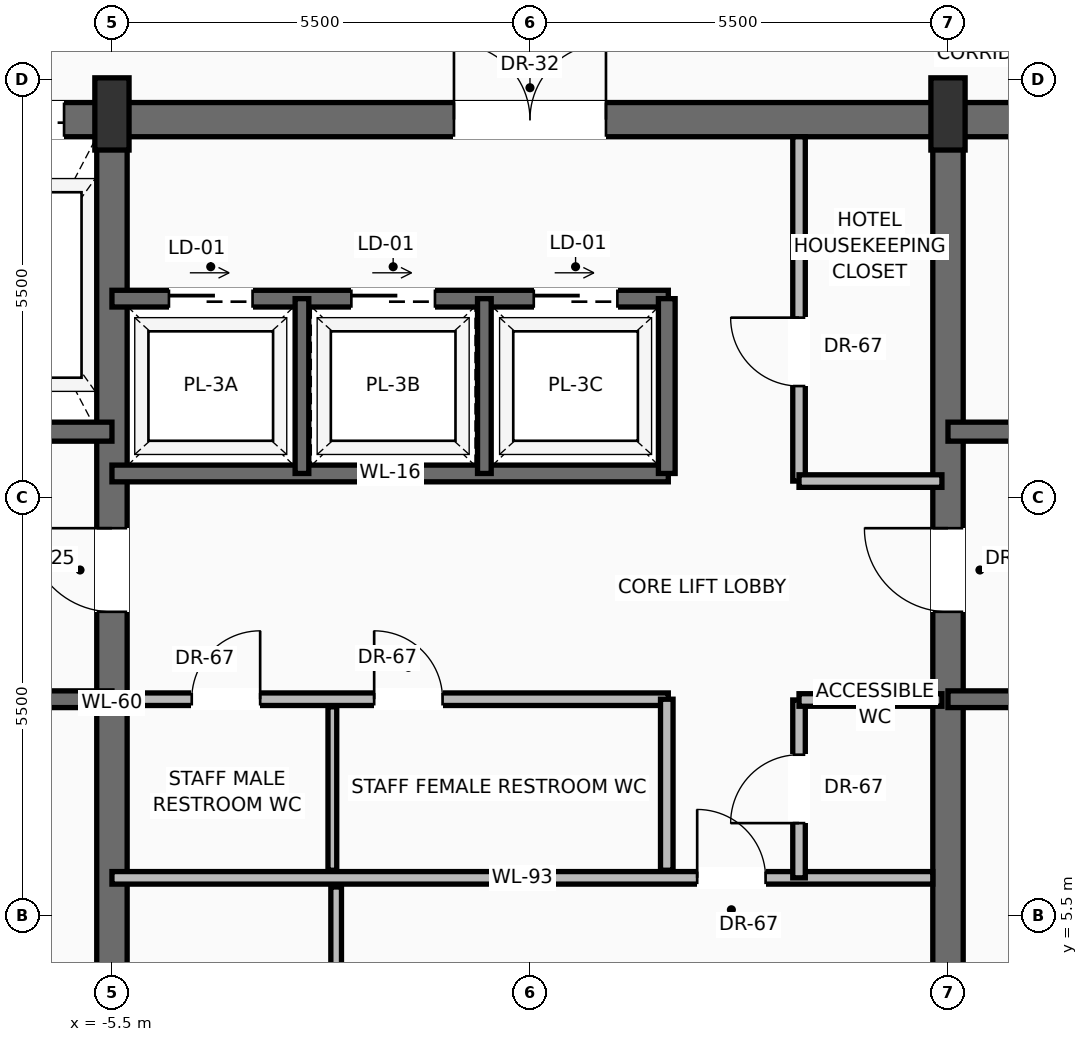
"""IFC4 building model, lengths in metres.
Left out: names, types, materials, properties, quantities, classifications, styles, units other than length and angle.
Written with IfcOpenShell. Run it as: python <this file> out.ifc"""

import sys

from ifc_helpers import new_model, si_unit, direction, frame, frame_2d, origin, origin_2d, place, context, subcontext, project, spatial, rectangle, extrude, source, transform, mapped, element, fill, save


model = new_model("IFC4")
c1 = context("Model", 3, precision=1e-05, world=origin(), true_north=direction((0.0, 1.0)))
c2 = subcontext(c1, "Body", "Model", "MODEL_VIEW")
j1 = project(units=[si_unit("LENGTHUNIT", "METRE"), si_unit("PLANEANGLEUNIT", "RADIAN")], contexts=[c1])
p1 = place(None, origin())
s1 = spatial("IfcSite", under=j1, at=p1, CompositionType="ELEMENT")
p2 = place(p1, origin())
s2 = spatial("IfcBuilding", under=s1, at=p2, CompositionType="ELEMENT")
p3 = place(p2, frame((0.0, 0.0, 290.25)))
s3 = spatial("IfcBuildingStorey", under=s2, at=p3, CompositionType="ELEMENT", Elevation=290.25)
p4 = place(p3, frame((-10.6, 15.975, 0.0), z_axis=(0.0, 0.0, 1.0), x_axis=(1.0, 0.0, 0.0)))
e1 = element("IfcWall", 1, at=p4, inside=s3, PredefinedType="SHEAR", context=c2, shape_type="SweptSolid", body=[
    extrude(rectangle(XDim=21.2, YDim=0.45, at=frame_2d((10.6, 0.0))), origin(), (0.0, 0.0, 1.0), 3.24),
])
p5 = place(p4, frame((3.17, 0.0, 0.0)))
e2 = element("IfcOpeningElement", 2, at=p5, cuts=e1, PredefinedType="OPENING", context=c2, shape_type="SweptSolid", body=[
    extrude(rectangle(XDim=1.3, YDim=2.3, at=frame_2d((0.65, 1.15))), frame((0.0, 0.235, 0.0), z_axis=(0.0, -1.0, 0.0), x_axis=(1.0, 0.0, 0.0)), (0.0, 0.0, 1.0), 0.47),
])
p6 = place(p4, frame((9.6, 0.0, 0.0)))
e3 = element("IfcOpeningElement", 3, at=p6, cuts=e1, PredefinedType="OPENING", context=c2, shape_type="SweptSolid", body=[
    extrude(rectangle(XDim=2.0, YDim=2.4, at=frame_2d((1.0, 1.2))), frame((0.0, 0.235, 0.0), z_axis=(0.0, -1.0, 0.0), x_axis=(1.0, 0.0, 0.0)), (0.0, 0.0, 1.0), 0.47),
])
p7 = place(p3, frame((-5.5, 0.625, 0.0), z_axis=(0.0, 0.0, 1.0), x_axis=(0.0, 1.0, 0.0)))
e4 = element("IfcWall", 4, at=p7, inside=s3, PredefinedType="SHEAR", context=c2, shape_type="SweptSolid", body=[
    extrude(rectangle(XDim=15.35, YDim=0.4, at=frame_2d((7.675, 0.0))), origin(), (0.0, 0.0, 1.0), 3.24),
])
p8 = place(p7, frame((8.875, 0.0, 0.0)))
e5 = element("IfcOpeningElement", 5, at=p8, cuts=e4, PredefinedType="OPENING", context=c2, shape_type="SweptSolid", body=[
    extrude(rectangle(XDim=1.1, YDim=2.2, at=frame_2d((0.55, 1.1))), frame((0.0, 0.21, 0.0), z_axis=(0.0, -1.0, 0.0), x_axis=(1.0, 0.0, 0.0)), (0.0, 0.0, 1.0), 0.42),
])
p9 = place(p3, frame((5.5, 0.625, 0.0), z_axis=(0.0, 0.0, 1.0), x_axis=(0.0, 1.0, 0.0)))
e6 = element("IfcWall", 6, at=p9, inside=s3, PredefinedType="SHEAR", context=c2, shape_type="SweptSolid", body=[
    extrude(rectangle(XDim=15.35, YDim=0.4, at=frame_2d((7.675, 0.0))), origin(), (0.0, 0.0, 1.0), 3.24),
])
p10 = place(p9, frame((8.875, 0.0, 0.0)))
e7 = element("IfcOpeningElement", 7, at=p10, cuts=e6, PredefinedType="OPENING", context=c2, shape_type="SweptSolid", body=[
    extrude(rectangle(XDim=1.1, YDim=2.2, at=frame_2d((0.55, 1.1))), frame((0.0, 0.21, 0.0), z_axis=(0.0, -1.0, 0.0), x_axis=(1.0, 0.0, 0.0)), (0.0, 0.0, 1.0), 0.42),
])
m1 = source(origin(), c2, "Body", "SweptSolid", [
    extrude(rectangle(XDim=0.45, YDim=0.95, at=origin_2d()), origin(), (0.0, 0.0, 1.0), 3.45),
])
for number, where, z_axis, x_axis in (
    (8, (-5.5, 16.05, 0.0), (0.0, 0.0, 1.0), (1.0, 0.0, 0.0)),
    (9, (5.5, 16.05, 0.0), (0.0, 0.0, 1.0), (1.0, 0.0, 0.0)),
):
    element("IfcColumn", number, at=place(p3, frame(where, z_axis=z_axis, x_axis=x_axis)), inside=s3, PredefinedType="PILASTER", context=c2, shape_type="MappedRepresentation", body=[
        mapped(m1, transform((0.0, 0.0, 0.0), scale=1.0)),
    ])
p11 = place(p3, frame((-5.5, 8.35, 0.0), z_axis=(0.0, 0.0, 1.0), x_axis=(-1.0, 0.0, 0.0)))
e10 = element("IfcWall", 10, at=p11, inside=s3, PredefinedType="SOLIDWALL", context=c2, shape_type="SweptSolid", body=[
    extrude(rectangle(XDim=4.65, YDim=0.22, at=frame_2d((2.325, 0.0))), origin(), (0.0, 0.0, 1.0), 3.24),
])
p12 = place(p11, frame((2.5, 0.0, 0.0)))
e11 = element("IfcOpeningElement", 11, at=p12, cuts=e10, PredefinedType="OPENING", context=c2, shape_type="SweptSolid", body=[
    extrude(rectangle(XDim=1.15, YDim=2.2, at=frame_2d((0.575, 1.1))), frame((0.0, 0.12, 0.0), z_axis=(0.0, -1.0, 0.0), x_axis=(1.0, 0.0, 0.0)), (0.0, 0.0, 1.0), 0.24),
])
p13 = place(p3, frame((-5.5, 11.87, 0.0), z_axis=(0.0, 0.0, 1.0), x_axis=(-1.0, 0.0, 0.0)))
e12 = element("IfcWall", 12, at=p13, inside=s3, PredefinedType="SOLIDWALL", context=c2, shape_type="SweptSolid", body=[
    extrude(rectangle(XDim=4.65, YDim=0.25, at=frame_2d((2.325, 0.0))), origin(), (0.0, 0.0, 1.0), 3.24),
])
p14 = place(p13, frame((2.95, 0.0, 0.0)))
e13 = element("IfcOpeningElement", 13, at=p14, cuts=e12, PredefinedType="OPENING", context=c2, shape_type="SweptSolid", body=[
    extrude(rectangle(XDim=1.2, YDim=2.25, at=frame_2d((0.6, 1.125))), frame((0.0, 0.135, 0.0), z_axis=(0.0, -1.0, 0.0), x_axis=(1.0, 0.0, 0.0)), (0.0, 0.0, 1.0), 0.27),
])
p15 = place(p3, frame((10.15, 8.35, 0.0), z_axis=(0.0, 0.0, 1.0), x_axis=(-1.0, 0.0, 0.0)))
e14 = element("IfcWall", 14, at=p15, inside=s3, PredefinedType="SOLIDWALL", context=c2, shape_type="SweptSolid", body=[
    extrude(rectangle(XDim=4.65, YDim=0.22, at=frame_2d((2.325, 0.0))), origin(), (0.0, 0.0, 1.0), 3.24),
])
p16 = place(p15, frame((1.0, 0.0, 0.0)))
e15 = element("IfcOpeningElement", 15, at=p16, cuts=e14, PredefinedType="OPENING", context=c2, shape_type="SweptSolid", body=[
    extrude(rectangle(XDim=1.15, YDim=2.2, at=frame_2d((0.575, 1.1))), frame((0.0, 0.12, 0.0), z_axis=(0.0, -1.0, 0.0), x_axis=(1.0, 0.0, 0.0)), (0.0, 0.0, 1.0), 0.24),
])
p17 = place(p3, frame((10.15, 11.87, 0.0), z_axis=(0.0, 0.0, 1.0), x_axis=(-1.0, 0.0, 0.0)))
e16 = element("IfcWall", 16, at=p17, inside=s3, PredefinedType="SOLIDWALL", context=c2, shape_type="SweptSolid", body=[
    extrude(rectangle(XDim=4.65, YDim=0.25, at=frame_2d((2.325, 0.0))), origin(), (0.0, 0.0, 1.0), 3.24),
])
p18 = place(p17, frame((0.5, 0.0, 0.0)))
e17 = element("IfcOpeningElement", 17, at=p18, cuts=e16, PredefinedType="OPENING", context=c2, shape_type="SweptSolid", body=[
    extrude(rectangle(XDim=1.2, YDim=2.25, at=frame_2d((0.6, 1.125))), frame((0.0, 0.135, 0.0), z_axis=(0.0, -1.0, 0.0), x_axis=(1.0, 0.0, 0.0)), (0.0, 0.0, 1.0), 0.27),
])
p19 = place(p3, frame((-5.5, 6.0, 0.0), z_axis=(0.0, 0.0, 1.0), x_axis=(1.0, 0.0, 0.0)))
e18 = element("IfcWall", 18, at=p19, inside=s3, PredefinedType="PARTITIONING", context=c2, shape_type="SweptSolid", body=[
    extrude(rectangle(XDim=10.8, YDim=0.165, at=frame_2d((5.4, 0.0))), origin(), (0.0, 0.0, 1.0), 3.232),
])
p20 = place(p19, frame((7.7, 0.0, 0.0)))
e19 = element("IfcOpeningElement", 19, at=p20, cuts=e18, PredefinedType="OPENING", context=c2, shape_type="SweptSolid", body=[
    extrude(rectangle(XDim=0.9, YDim=2.1, at=frame_2d((0.45, 1.05))), frame((0.0, 0.093, 0.0), z_axis=(0.0, -1.0, 0.0), x_axis=(1.0, 0.0, 0.0)), (0.0, 0.0, 1.0), 0.185),
])
p21 = place(p3, frame((-2.55, 0.85, 0.0), z_axis=(0.0, 0.0, 1.0), x_axis=(0.0, 1.0, 0.0)))
e20 = element("IfcWall", 20, at=p21, inside=s3, PredefinedType="PARTITIONING", context=c2, shape_type="SweptSolid", body=[
    extrude(rectangle(XDim=5.03, YDim=0.14, at=frame_2d((2.515, 0.0))), origin(), (0.0, 0.0, 1.0), 3.232),
])
p22 = place(p21, frame((2.1, 0.0, 0.0)))
e21 = element("IfcOpeningElement", 21, at=p22, cuts=e20, PredefinedType="OPENING", context=c2, shape_type="SweptSolid", body=[
    extrude(rectangle(XDim=0.9, YDim=2.1, at=frame_2d((0.45, 1.05))), frame((0.0, 0.08, 0.0), z_axis=(0.0, -1.0, 0.0), x_axis=(1.0, 0.0, 0.0)), (0.0, 0.0, 1.0), 0.16),
])
p23 = place(p3, frame((3.54, 6.0, 0.0), z_axis=(0.0, 0.0, 1.0), x_axis=(0.0, 1.0, 0.0)))
e22 = element("IfcWall", 22, at=p23, inside=s3, PredefinedType="PARTITIONING", context=c2, shape_type="SweptSolid", body=[
    extrude(rectangle(XDim=2.34, YDim=0.165, at=frame_2d((1.17, 0.0))), origin(), (0.0, 0.0, 1.0), 3.232),
])
p24 = place(p23, frame((0.72, 0.0, 0.0)))
e23 = element("IfcOpeningElement", 23, at=p24, cuts=e22, PredefinedType="OPENING", context=c2, shape_type="SweptSolid", body=[
    extrude(rectangle(XDim=0.9, YDim=2.1, at=frame_2d((0.45, 1.05))), frame((0.0, 0.093, 0.0), z_axis=(0.0, -1.0, 0.0), x_axis=(1.0, 0.0, 0.0)), (0.0, 0.0, 1.0), 0.185),
])
p25 = place(p3, frame((3.54, 8.34, 0.0), z_axis=(0.0, 0.0, 1.0), x_axis=(1.0, 0.0, 0.0)))
e24 = element("IfcWall", 24, at=p25, inside=s3, PredefinedType="PARTITIONING", context=c2, shape_type="SweptSolid", body=[
    extrude(rectangle(XDim=1.88, YDim=0.165, at=frame_2d((0.94, 0.0))), origin(), (0.0, 0.0, 1.0), 3.232),
])
p26 = place(p3, frame((-5.3, 8.35, 0.0), z_axis=(0.0, 0.0, 1.0), x_axis=(1.0, 0.0, 0.0)))
e25 = element("IfcWall", 25, at=p26, inside=s3, PredefinedType="PARTITIONING", context=c2, shape_type="SweptSolid", body=[
    extrude(rectangle(XDim=7.12, YDim=0.165, at=frame_2d((3.56, 0.0))), origin(), (0.0, 0.0, 1.0), 3.232),
])
p27 = place(p26, frame((0.85, 0.0, 0.0)))
e26 = element("IfcOpeningElement", 26, at=p27, cuts=e25, PredefinedType="OPENING", context=c2, shape_type="SweptSolid", body=[
    extrude(rectangle(XDim=0.9, YDim=2.1, at=frame_2d((0.45, 1.05))), frame((0.0, 0.093, 0.0), z_axis=(0.0, -1.0, 0.0), x_axis=(1.0, 0.0, 0.0)), (0.0, 0.0, 1.0), 0.185),
])
p28 = place(p26, frame((3.25, 0.0, 0.0)))
e27 = element("IfcOpeningElement", 27, at=p28, cuts=e25, PredefinedType="OPENING", context=c2, shape_type="SweptSolid", body=[
    extrude(rectangle(XDim=0.9, YDim=2.1, at=frame_2d((0.45, 1.05))), frame((0.0, 0.093, 0.0), z_axis=(0.0, -1.0, 0.0), x_axis=(1.0, 0.0, 0.0)), (0.0, 0.0, 1.0), 0.185),
])
p29 = place(p3, frame((1.8, 6.1, 0.0), z_axis=(0.0, 0.0, 1.0), x_axis=(0.0, 1.0, 0.0)))
e28 = element("IfcWall", 28, at=p29, inside=s3, PredefinedType="PARTITIONING", context=c2, shape_type="SweptSolid", body=[
    extrude(rectangle(XDim=2.25, YDim=0.165, at=frame_2d((1.125, 0.0))), origin(), (0.0, 0.0, 1.0), 3.232),
])
p30 = place(p3, frame((-2.6, 6.1, 0.0), z_axis=(0.0, 0.0, 1.0), x_axis=(0.0, 1.0, 0.0)))
e29 = element("IfcWall", 29, at=p30, inside=s3, PredefinedType="PARTITIONING", context=c2, shape_type="SweptSolid", body=[
    extrude(rectangle(XDim=2.15, YDim=0.115, at=frame_2d((1.075, 0.0))), origin(), (0.0, 0.0, 1.0), 3.232),
])
p31 = place(p3, frame((-5.5, 11.32, 0.0), z_axis=(0.0, 0.0, 1.0), x_axis=(1.0, 0.0, 0.0)))
e30 = element("IfcWall", 30, at=p31, inside=s3, PredefinedType="SOLIDWALL", context=c2, shape_type="SweptSolid", body=[
    extrude(rectangle(XDim=7.32, YDim=0.22, at=frame_2d((3.66, 0.0))), origin(), (0.0, 0.0, 1.0), 3.24),
])
p32 = place(p3, frame((-5.5, 13.62, 0.0), z_axis=(0.0, 0.0, 1.0), x_axis=(1.0, 0.0, 0.0)))
e31 = element("IfcWall", 31, at=p32, inside=s3, PredefinedType="SOLIDWALL", context=c2, shape_type="SweptSolid", body=[
    extrude(rectangle(XDim=7.32, YDim=0.22, at=frame_2d((3.66, 0.0))), origin(), (0.0, 0.0, 1.0), 3.24),
])
p33 = place(p32, frame((0.75, 0.0, 0.0)))
e32 = element("IfcOpeningElement", 32, at=p33, cuts=e31, PredefinedType="OPENING", context=c2, shape_type="SweptSolid", body=[
    extrude(rectangle(XDim=1.1, YDim=2.2, at=frame_2d((0.55, 1.1))), frame((0.0, 0.12, 0.0), z_axis=(0.0, -1.0, 0.0), x_axis=(1.0, 0.0, 0.0)), (0.0, 0.0, 1.0), 0.24),
])
p34 = place(p32, frame((3.15, 0.0, 0.0)))
e33 = element("IfcOpeningElement", 33, at=p34, cuts=e31, PredefinedType="OPENING", context=c2, shape_type="SweptSolid", body=[
    extrude(rectangle(XDim=1.1, YDim=2.2, at=frame_2d((0.55, 1.1))), frame((0.0, 0.12, 0.0), z_axis=(0.0, -1.0, 0.0), x_axis=(1.0, 0.0, 0.0)), (0.0, 0.0, 1.0), 0.24),
])
p35 = place(p32, frame((5.55, 0.0, 0.0)))
e34 = element("IfcOpeningElement", 34, at=p35, cuts=e31, PredefinedType="OPENING", context=c2, shape_type="SweptSolid", body=[
    extrude(rectangle(XDim=1.1, YDim=2.2, at=frame_2d((0.55, 1.1))), frame((0.0, 0.12, 0.0), z_axis=(0.0, -1.0, 0.0), x_axis=(1.0, 0.0, 0.0)), (0.0, 0.0, 1.0), 0.24),
])
p36 = place(p3, frame((1.8, 11.32, 0.0), z_axis=(0.0, 0.0, 1.0), x_axis=(0.0, 1.0, 0.0)))
e35 = element("IfcWall", 35, at=p36, inside=s3, PredefinedType="SOLIDWALL", context=c2, shape_type="SweptSolid", body=[
    extrude(rectangle(XDim=2.3, YDim=0.22, at=frame_2d((1.15, 0.0))), origin(), (0.0, 0.0, 1.0), 3.24),
])
for number, where, z_axis, x_axis in (
    (36, (-3.0, 11.32, 0.0), (0.0, 0.0, 1.0), (0.0, 1.0, 0.0)),
    (37, (-0.6, 11.32, 0.0), (0.0, 0.0, 1.0), (0.0, 1.0, 0.0)),
):
    element("IfcWall", number, at=place(p3, frame(where, z_axis=z_axis, x_axis=x_axis)), inside=s3, PredefinedType="SOLIDWALL", context=c2, shape_type="SweptSolid", body=[
        extrude(rectangle(XDim=2.3, YDim=0.18, at=frame_2d((1.15, 0.0))), origin(), (0.0, 0.0, 1.0), 3.24),
    ])
p37 = place(p3, frame((3.54, 11.22, 0.0), z_axis=(0.0, 0.0, 1.0), x_axis=(0.0, 1.0, 0.0)))
e38 = element("IfcWall", 38, at=p37, inside=s3, PredefinedType="PARTITIONING", context=c2, shape_type="SweptSolid", body=[
    extrude(rectangle(XDim=4.53, YDim=0.165, at=frame_2d((2.265, 0.0))), origin(), (0.0, 0.0, 1.0), 3.232),
])
p38 = place(p37, frame((1.25, 0.0, 0.0)))
e39 = element("IfcOpeningElement", 39, at=p38, cuts=e38, PredefinedType="OPENING", context=c2, shape_type="SweptSolid", body=[
    extrude(rectangle(XDim=0.9, YDim=2.1, at=frame_2d((0.45, 1.05))), frame((0.0, 0.093, 0.0), z_axis=(0.0, -1.0, 0.0), x_axis=(1.0, 0.0, 0.0)), (0.0, 0.0, 1.0), 0.185),
])
p39 = place(p3, frame((3.54, 11.22, 0.0), z_axis=(0.0, 0.0, 1.0), x_axis=(1.0, 0.0, 0.0)))
e40 = element("IfcWall", 40, at=p39, inside=s3, PredefinedType="PARTITIONING", context=c2, shape_type="SweptSolid", body=[
    extrude(rectangle(XDim=1.88, YDim=0.165, at=frame_2d((0.94, 0.0))), origin(), (0.0, 0.0, 1.0), 3.232),
])
m2 = source(origin(), c2, "Body", "SweptSolid", [
    extrude(rectangle(XDim=1.1, YDim=2.2, at=frame_2d((0.55, 1.1))), frame((0.0, 0.025, 0.0), z_axis=(0.0, -1.0, 0.0), x_axis=(1.0, 0.0, 0.0)), (0.0, 0.0, 1.0), 0.05),
])
p40 = place(p8, origin())
e41 = element("IfcDoor", 41, at=p40, inside=s3, OperationType="SINGLE_SWING_RIGHT", PredefinedType="DOOR", context=c2, shape_type="MappedRepresentation", body=[
    mapped(m2, transform((0.0, 0.0, 0.0), scale=1.0)),
])
fill(e5, e41)
m3 = source(origin(), c2, "Body", "SweptSolid", [
    extrude(rectangle(XDim=1.3, YDim=2.3, at=frame_2d((0.65, 1.15))), frame((0.0, 0.025, 0.0), z_axis=(0.0, -1.0, 0.0), x_axis=(1.0, 0.0, 0.0)), (0.0, 0.0, 1.0), 0.05),
])
p41 = place(p5, origin())
e42 = element("IfcDoor", 42, at=p41, inside=s3, OperationType="SLIDING_TO_RIGHT", PredefinedType="DOOR", context=c2, shape_type="MappedRepresentation", body=[
    mapped(m3, transform((0.0, 0.0, 0.0), scale=1.0)),
])
fill(e2, e42)
p42 = place(p10, origin())
e43 = element("IfcDoor", 43, at=p42, inside=s3, OperationType="SINGLE_SWING_RIGHT", PredefinedType="DOOR", context=c2, shape_type="MappedRepresentation", body=[
    mapped(m2, transform((0.0, 0.0, 0.0), scale=1.0)),
])
fill(e7, e43)
m4 = source(origin(), c2, "Body", "SweptSolid", [
    extrude(rectangle(XDim=2.0, YDim=2.4, at=frame_2d((1.0, 1.2))), frame((0.0, 0.025, 0.0), z_axis=(0.0, -1.0, 0.0), x_axis=(1.0, 0.0, 0.0)), (0.0, 0.0, 1.0), 0.05),
])
p43 = place(p6, origin())
e44 = element("IfcDoor", 44, at=p43, inside=s3, OperationType="DOUBLE_DOOR_SINGLE_SWING", PredefinedType="DOOR", context=c2, shape_type="MappedRepresentation", body=[
    mapped(m4, transform((0.0, 0.0, 0.0), scale=1.0)),
])
fill(e3, e44)
m5 = source(origin(), c2, "Body", "SweptSolid", [
    extrude(rectangle(XDim=0.9, YDim=2.1, at=frame_2d((0.45, 1.05))), frame((0.0, 0.025, 0.0), z_axis=(0.0, -1.0, 0.0), x_axis=(1.0, 0.0, 0.0)), (0.0, 0.0, 1.0), 0.05),
])
p44 = place(p20, origin())
e45 = element("IfcDoor", 45, at=p44, inside=s3, OperationType="SINGLE_SWING_LEFT", PredefinedType="DOOR", context=c2, shape_type="MappedRepresentation", body=[
    mapped(m5, transform((0.0, 0.0, 0.0), scale=1.0)),
])
fill(e19, e45)
p45 = place(p24, origin())
e46 = element("IfcDoor", 46, at=p45, inside=s3, OperationType="SINGLE_SWING_LEFT", PredefinedType="DOOR", context=c2, shape_type="MappedRepresentation", body=[
    mapped(m5, transform((0.0, 0.0, 0.0), scale=1.0)),
])
fill(e23, e46)
p46 = place(p27, origin())
e47 = element("IfcDoor", 47, at=p46, inside=s3, OperationType="SINGLE_SWING_RIGHT", PredefinedType="DOOR", context=c2, shape_type="MappedRepresentation", body=[
    mapped(m5, transform((0.0, 0.0, 0.0), scale=1.0)),
])
fill(e26, e47)
p47 = place(p28, origin())
e48 = element("IfcDoor", 48, at=p47, inside=s3, OperationType="SINGLE_SWING_LEFT", PredefinedType="DOOR", context=c2, shape_type="MappedRepresentation", body=[
    mapped(m5, transform((0.0, 0.0, 0.0), scale=1.0)),
])
fill(e27, e48)
m6 = source(origin(), c2, "Body", "SweptSolid", [
    extrude(rectangle(XDim=1.1, YDim=2.2, at=frame_2d((0.55, 1.1))), frame((0.0, 0.025, 0.0), z_axis=(0.0, -1.0, 0.0), x_axis=(1.0, 0.0, 0.0)), (0.0, 0.0, 1.0), 0.05),
])
p48 = place(p33, origin())
e49 = element("IfcDoor", 49, at=p48, inside=s3, OperationType="SLIDING_TO_RIGHT", PredefinedType="DOOR", context=c2, shape_type="MappedRepresentation", body=[
    mapped(m6, transform((0.0, 0.0, 0.0), scale=1.0)),
])
fill(e32, e49)
p49 = place(p34, origin())
e50 = element("IfcDoor", 50, at=p49, inside=s3, OperationType="SLIDING_TO_RIGHT", PredefinedType="DOOR", context=c2, shape_type="MappedRepresentation", body=[
    mapped(m6, transform((0.0, 0.0, 0.0), scale=1.0)),
])
fill(e33, e50)
p50 = place(p35, origin())
e51 = element("IfcDoor", 51, at=p50, inside=s3, OperationType="SLIDING_TO_RIGHT", PredefinedType="DOOR", context=c2, shape_type="MappedRepresentation", body=[
    mapped(m6, transform((0.0, 0.0, 0.0), scale=1.0)),
])
fill(e34, e51)
p51 = place(p38, origin())
e52 = element("IfcDoor", 52, at=p51, inside=s3, OperationType="SINGLE_SWING_RIGHT", PredefinedType="DOOR", context=c2, shape_type="MappedRepresentation", body=[
    mapped(m5, transform((0.0, 0.0, 0.0), scale=1.0)),
])
fill(e39, e52)
save(model, sys.argv[1])
